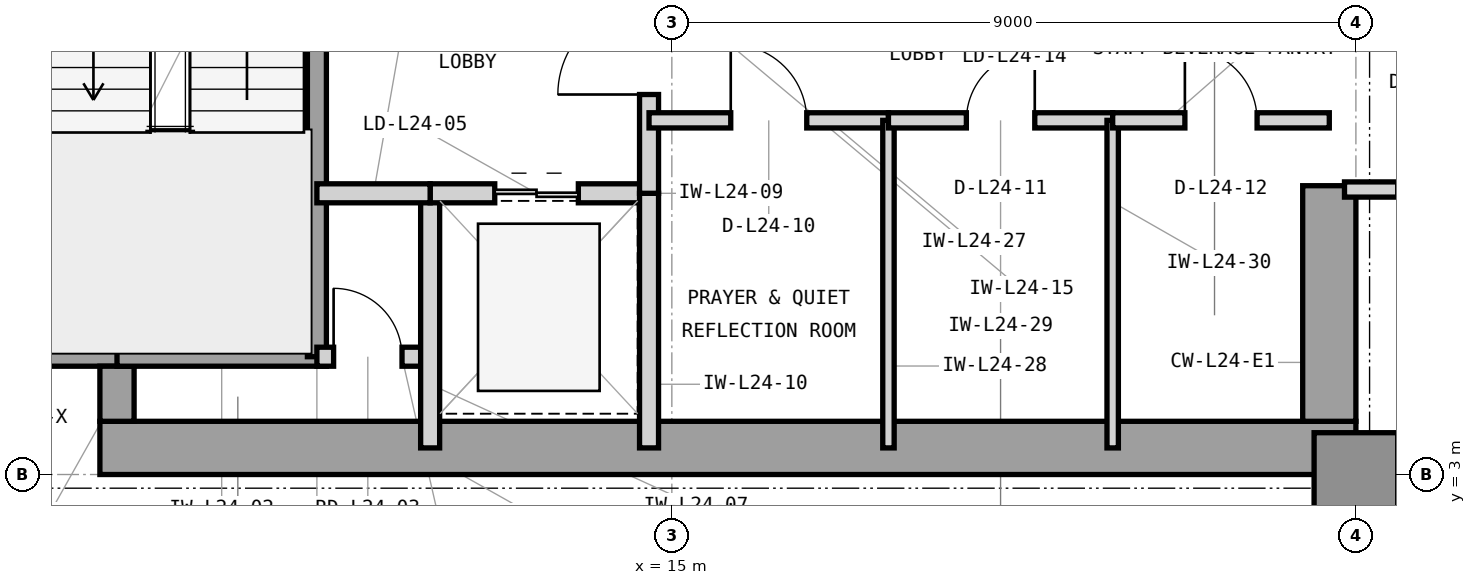
"""IFC4 building model, lengths in metres.
Left out: names, types, materials, properties, quantities, classifications, styles, units other than length and angle.
Written with IfcOpenShell. Run it as: python <this file> out.ifc"""

import sys

from ifc_helpers import new_model, si_unit, direction, frame, frame_2d, origin, origin_2d, place, context, subcontext, project, spatial, rectangle, extrude, element, fill, save


model = new_model("IFC4")
c1 = context("Model", 3, precision=1e-05, world=origin(), true_north=direction((0.0, 1.0)))
c2 = subcontext(c1, "Body", "Model", "MODEL_VIEW")
j1 = project(units=[si_unit("LENGTHUNIT", "METRE"), si_unit("PLANEANGLEUNIT", "RADIAN")], contexts=[c1])
p1 = place(None, origin())
s1 = spatial("IfcSite", under=j1, at=p1, CompositionType="ELEMENT")
p2 = place(p1, origin())
s2 = spatial("IfcBuilding", under=s1, at=p2, CompositionType="ELEMENT")
p3 = place(p2, frame((0.0, 0.0, 105.0)))
s3 = spatial("IfcBuildingStorey", under=s2, at=p3, CompositionType="ELEMENT", Elevation=105.0)
p4 = place(p3, frame((7.475, 3.35, 0.0), z_axis=(0.0, 0.0, 1.0), x_axis=(1.0, 0.0, 0.0)))
e1 = element("IfcWall", 1, at=p4, inside=s3, PredefinedType="SHEAR", context=c2, shape_type="SweptSolid", body=[
    extrude(rectangle(XDim=16.525, YDim=0.7, at=frame_2d((8.262, 0.0))), origin(), (0.0, 0.0, 1.0), 3.9),
])
p5 = place(p3, frame((23.65, 3.7, 0.0), z_axis=(0.0, 0.0, 1.0), x_axis=(0.0, 1.0, 0.0)))
e2 = element("IfcWall", 2, at=p5, inside=s3, PredefinedType="SHEAR", context=c2, shape_type="SweptSolid", body=[
    extrude(rectangle(XDim=3.1, YDim=0.7, at=frame_2d((1.55, 0.0))), origin(), (0.0, 0.0, 1.0), 3.9),
])
p6 = place(p3, frame((6.7, 4.65, 0.0), z_axis=(0.0, 0.0, 1.0), x_axis=(1.0, 0.0, 0.0)))
e3 = element("IfcWall", 3, at=p6, inside=s3, PredefinedType="SHEAR", context=c2, shape_type="SweptSolid", body=[
    extrude(rectangle(XDim=1.225, YDim=0.45, at=frame_2d((0.613, 0.0))), origin(), (0.0, 0.0, 1.0), 3.9),
])
p7 = place(p3, frame((7.7, 3.7, 0.0), z_axis=(0.0, 0.0, 1.0), x_axis=(0.0, 1.0, 0.0)))
e4 = element("IfcWall", 4, at=p7, inside=s3, PredefinedType="SHEAR", context=c2, shape_type="SweptSolid", body=[
    extrude(rectangle(XDim=0.725, YDim=0.45, at=frame_2d((0.363, 0.0))), origin(), (0.0, 0.0, 1.0), 3.9),
])
p8 = place(p3, frame((24.0, 3.0, 0.0), z_axis=(0.0, 0.0, 1.0), x_axis=(1.0, 0.0, 0.0)))
e5 = element("IfcColumn", 5, at=p8, inside=s3, PredefinedType="COLUMN", context=c2, shape_type="SweptSolid", body=[
    extrude(rectangle(XDim=1.1, YDim=1.1, at=origin_2d()), origin(), (0.0, 0.0, 1.0), 3.9),
])
p9 = place(p3, frame((23.9, 3.21, 0.0), z_axis=(0.0, 0.0, 1.0), x_axis=(1.0, 0.0, 0.0)))
e6 = element("IfcWall", 6, at=p9, inside=s3, PredefinedType="STANDARD", context=c2, shape_type="SweptSolid", body=[
    extrude(rectangle(XDim=37.5, YDim=0.42, at=frame_2d((18.75, 0.0))), origin(), (0.0, 0.0, 1.0), 3.7),
])
p10 = place(p9, frame((19.844, 0.0, 0.85)))
e7 = element("IfcOpeningElement", 7, at=p10, cuts=e6, PredefinedType="OPENING", context=c2, shape_type="SweptSolid", body=[
    extrude(rectangle(XDim=2.5, YDim=2.25, at=frame_2d((1.25, 1.125))), frame((0.0, 0.22, 0.0), z_axis=(0.0, -1.0, 0.0), x_axis=(1.0, 0.0, 0.0)), (0.0, 0.0, 1.0), 0.44),
])
p11 = place(p9, frame((1.1, 0.0, 0.85)))
e8 = element("IfcOpeningElement", 8, at=p11, cuts=e6, PredefinedType="OPENING", context=c2, shape_type="SweptSolid", body=[
    extrude(rectangle(XDim=1.2, YDim=2.25, at=frame_2d((0.6, 1.125))), frame((0.0, 0.22, 0.0), z_axis=(0.0, -1.0, 0.0), x_axis=(1.0, 0.0, 0.0)), (0.0, 0.0, 1.0), 0.44),
])
p12 = place(p9, frame((5.286, 0.0, 0.85)))
e9 = element("IfcOpeningElement", 9, at=p12, cuts=e6, PredefinedType="OPENING", context=c2, shape_type="SweptSolid", body=[
    extrude(rectangle(XDim=2.5, YDim=2.25, at=frame_2d((1.25, 1.125))), frame((0.0, 0.22, 0.0), z_axis=(0.0, -1.0, 0.0), x_axis=(1.0, 0.0, 0.0)), (0.0, 0.0, 1.0), 0.44),
])
p13 = place(p9, frame((13.036, 0.0, 0.85)))
e10 = element("IfcOpeningElement", 10, at=p13, cuts=e6, PredefinedType="OPENING", context=c2, shape_type="SweptSolid", body=[
    extrude(rectangle(XDim=2.5, YDim=2.25, at=frame_2d((1.25, 1.125))), frame((0.0, 0.22, 0.0), z_axis=(0.0, -1.0, 0.0), x_axis=(1.0, 0.0, 0.0)), (0.0, 0.0, 1.0), 0.44),
])
p14 = place(p9, frame((27.986, 0.0, 0.85)))
e11 = element("IfcOpeningElement", 11, at=p14, cuts=e6, PredefinedType="OPENING", context=c2, shape_type="SweptSolid", body=[
    extrude(rectangle(XDim=1.2, YDim=2.25, at=frame_2d((0.6, 1.125))), frame((0.0, 0.22, 0.0), z_axis=(0.0, -1.0, 0.0), x_axis=(1.0, 0.0, 0.0)), (0.0, 0.0, 1.0), 0.44),
])
p15 = place(p3, frame((7.7, 4.55, 0.0), z_axis=(0.0, 0.0, 1.0), x_axis=(1.0, 0.0, 0.0)))
e12 = element("IfcWall", 12, at=p15, inside=s3, PredefinedType="SHEAR", context=c2, shape_type="SweptSolid", body=[
    extrude(rectangle(XDim=2.755, YDim=0.25, at=frame_2d((1.377, 0.0))), origin(), (0.0, 0.0, 1.0), 3.9),
])
p16 = place(p3, frame((10.33, 4.55, 0.0), z_axis=(0.0, 0.0, 1.0), x_axis=(0.0, 1.0, 0.0)))
e13 = element("IfcWall", 13, at=p16, inside=s3, PredefinedType="SHEAR", context=c2, shape_type="SweptSolid", body=[
    extrude(rectangle(XDim=7.45, YDim=0.25, at=frame_2d((3.725, 0.0))), origin(), (0.0, 0.0, 1.0), 3.9),
])
p17 = place(p16, frame((5.9, 0.0, 0.0)))
e14 = element("IfcOpeningElement", 14, at=p17, cuts=e13, PredefinedType="OPENING", context=c2, shape_type="SweptSolid", body=[
    extrude(rectangle(XDim=1.25, YDim=2.2, at=frame_2d((0.625, 1.1))), frame((0.0, 0.135, 0.0), z_axis=(0.0, -1.0, 0.0), x_axis=(1.0, 0.0, 0.0)), (0.0, 0.0, 1.0), 0.27),
])
p18 = place(p3, frame((10.33, 4.55, 0.0), z_axis=(0.0, 0.0, 1.0), x_axis=(1.0, 0.0, 0.0)))
e15 = element("IfcWall", 15, at=p18, inside=s3, PredefinedType="PARTITIONING", context=c2, shape_type="SweptSolid", body=[
    extrude(rectangle(XDim=1.49, YDim=0.25, at=frame_2d((0.745, 0.0))), origin(), (0.0, 0.0, 1.0), 3.69),
])
p19 = place(p18, frame((0.22, 0.0, 0.0)))
e16 = element("IfcOpeningElement", 16, at=p19, cuts=e15, PredefinedType="OPENING", context=c2, shape_type="SweptSolid", body=[
    extrude(rectangle(XDim=0.9, YDim=2.1, at=frame_2d((0.45, 1.05))), frame((0.0, 0.135, 0.0), z_axis=(0.0, -1.0, 0.0), x_axis=(1.0, 0.0, 0.0)), (0.0, 0.0, 1.0), 0.27),
])
p20 = place(p3, frame((11.82, 3.35, 0.0), z_axis=(0.0, 0.0, 1.0), x_axis=(0.0, 1.0, 0.0)))
e17 = element("IfcWall", 17, at=p20, inside=s3, PredefinedType="PARTITIONING", context=c2, shape_type="SweptSolid", body=[
    extrude(rectangle(XDim=3.35, YDim=0.25, at=frame_2d((1.675, 0.0))), origin(), (0.0, 0.0, 1.0), 3.69),
])
p21 = place(p3, frame((11.82, 6.7, 0.0), z_axis=(0.0, 0.0, 1.0), x_axis=(1.0, 0.0, 0.0)))
e18 = element("IfcWall", 18, at=p21, inside=s3, PredefinedType="PARTITIONING", context=c2, shape_type="SweptSolid", body=[
    extrude(rectangle(XDim=2.88, YDim=0.25, at=frame_2d((1.44, 0.0))), origin(), (0.0, 0.0, 1.0), 3.227),
])
p22 = place(p21, frame((0.85, 0.0, 0.0)))
e19 = element("IfcOpeningElement", 19, at=p22, cuts=e18, PredefinedType="OPENING", context=c2, shape_type="SweptSolid", body=[
    extrude(rectangle(XDim=1.1, YDim=2.25, at=frame_2d((0.55, 1.125))), frame((0.0, 0.135, 0.0), z_axis=(0.0, -1.0, 0.0), x_axis=(1.0, 0.0, 0.0)), (0.0, 0.0, 1.0), 0.27),
])
p23 = place(p3, frame((14.7, 3.35, 0.0), z_axis=(0.0, 0.0, 1.0), x_axis=(0.0, 1.0, 0.0)))
e20 = element("IfcWall", 20, at=p23, inside=s3, PredefinedType="PARTITIONING", context=c2, shape_type="SweptSolid", body=[
    extrude(rectangle(XDim=3.35, YDim=0.25, at=frame_2d((1.675, 0.0))), origin(), (0.0, 0.0, 1.0), 3.69),
])
p24 = place(p3, frame((14.7, 6.7, 0.0), z_axis=(0.0, 0.0, 1.0), x_axis=(0.0, 1.0, 0.0)))
e21 = element("IfcWall", 21, at=p24, inside=s3, PredefinedType="PARTITIONING", context=c2, shape_type="SweptSolid", body=[
    extrude(rectangle(XDim=3.8, YDim=0.25, at=frame_2d((1.9, 0.0))), origin(), (0.0, 0.0, 1.0), 3.69),
])
p25 = place(p24, frame((1.3, 0.0, 0.0)))
e22 = element("IfcOpeningElement", 22, at=p25, cuts=e21, PredefinedType="OPENING", context=c2, shape_type="SweptSolid", body=[
    extrude(rectangle(XDim=1.2, YDim=2.2, at=frame_2d((0.6, 1.1))), frame((0.0, 0.135, 0.0), z_axis=(0.0, -1.0, 0.0), x_axis=(1.0, 0.0, 0.0)), (0.0, 0.0, 1.0), 0.27),
])
p26 = place(p3, frame((10.33, 6.7, 0.0), z_axis=(0.0, 0.0, 1.0), x_axis=(1.0, 0.0, 0.0)))
e23 = element("IfcWall", 23, at=p26, inside=s3, PredefinedType="PARTITIONING", context=c2, shape_type="SweptSolid", body=[
    extrude(rectangle(XDim=1.49, YDim=0.25, at=frame_2d((0.745, 0.0))), origin(), (0.0, 0.0, 1.0), 3.227),
])
p27 = place(p3, frame((14.7, 7.66, 0.0), z_axis=(0.0, 0.0, 1.0), x_axis=(1.0, 0.0, 0.0)))
e24 = element("IfcWall", 24, at=p27, inside=s3, PredefinedType="PARTITIONING", context=c2, shape_type="SweptSolid", body=[
    extrude(rectangle(XDim=3.15, YDim=0.2, at=frame_2d((1.575, 0.0))), origin(), (0.0, 0.0, 1.0), 3.69),
])
p28 = place(p27, frame((1.075, 0.0, 0.0)))
e25 = element("IfcOpeningElement", 25, at=p28, cuts=e24, PredefinedType="OPENING", context=c2, shape_type="SweptSolid", body=[
    extrude(rectangle(XDim=1.0, YDim=2.15, at=frame_2d((0.5, 1.075))), frame((0.0, 0.11, 0.0), z_axis=(0.0, -1.0, 0.0), x_axis=(1.0, 0.0, 0.0)), (0.0, 0.0, 1.0), 0.22),
])
p29 = place(p3, frame((17.85, 3.35, 0.0), z_axis=(0.0, 0.0, 1.0), x_axis=(0.0, 1.0, 0.0)))
e26 = element("IfcWall", 26, at=p29, inside=s3, PredefinedType="PARTITIONING", context=c2, shape_type="SweptSolid", body=[
    extrude(rectangle(XDim=4.31, YDim=0.15, at=frame_2d((2.155, 0.0))), origin(), (0.0, 0.0, 1.0), 3.69),
])
p30 = place(p3, frame((17.85, 7.66, 0.0), z_axis=(0.0, 0.0, 1.0), x_axis=(1.0, 0.0, 0.0)))
e27 = element("IfcWall", 27, at=p30, inside=s3, PredefinedType="PARTITIONING", context=c2, shape_type="SweptSolid", body=[
    extrude(rectangle(XDim=2.95, YDim=0.2, at=frame_2d((1.475, 0.0))), origin(), (0.0, 0.0, 1.0), 3.69),
])
p31 = place(p30, frame((1.025, 0.0, 0.0)))
e28 = element("IfcOpeningElement", 28, at=p31, cuts=e27, PredefinedType="OPENING", context=c2, shape_type="SweptSolid", body=[
    extrude(rectangle(XDim=0.9, YDim=2.1, at=frame_2d((0.45, 1.05))), frame((0.0, 0.11, 0.0), z_axis=(0.0, -1.0, 0.0), x_axis=(1.0, 0.0, 0.0)), (0.0, 0.0, 1.0), 0.22),
])
p32 = place(p3, frame((20.8, 3.35, 0.0), z_axis=(0.0, 0.0, 1.0), x_axis=(0.0, 1.0, 0.0)))
e29 = element("IfcWall", 29, at=p32, inside=s3, PredefinedType="PARTITIONING", context=c2, shape_type="SweptSolid", body=[
    extrude(rectangle(XDim=4.31, YDim=0.15, at=frame_2d((2.155, 0.0))), origin(), (0.0, 0.0, 1.0), 3.69),
])
p33 = place(p3, frame((20.8, 7.66, 0.0), z_axis=(0.0, 0.0, 1.0), x_axis=(1.0, 0.0, 0.0)))
e30 = element("IfcWall", 30, at=p33, inside=s3, PredefinedType="PARTITIONING", context=c2, shape_type="SweptSolid", body=[
    extrude(rectangle(XDim=2.85, YDim=0.2, at=frame_2d((1.425, 0.0))), origin(), (0.0, 0.0, 1.0), 3.69),
])
p34 = place(p33, frame((0.95, 0.0, 0.0)))
e31 = element("IfcOpeningElement", 31, at=p34, cuts=e30, PredefinedType="OPENING", context=c2, shape_type="SweptSolid", body=[
    extrude(rectangle(XDim=0.95, YDim=2.1, at=frame_2d((0.475, 1.05))), frame((0.0, 0.11, 0.0), z_axis=(0.0, -1.0, 0.0), x_axis=(1.0, 0.0, 0.0)), (0.0, 0.0, 1.0), 0.22),
])
p35 = place(p3, frame((23.85, 6.75, 0.0), z_axis=(0.0, 0.0, 1.0), x_axis=(1.0, 0.0, 0.0)))
e32 = element("IfcWall", 32, at=p35, inside=s3, PredefinedType="PARTITIONING", context=c2, shape_type="SweptSolid", body=[
    extrude(rectangle(XDim=2.85, YDim=0.2, at=frame_2d((1.425, 0.0))), origin(), (0.0, 0.0, 1.0), 3.69),
])
p36 = place(p35, frame((0.7, 0.0, 0.0)))
e33 = element("IfcOpeningElement", 33, at=p36, cuts=e32, PredefinedType="OPENING", context=c2, shape_type="SweptSolid", body=[
    extrude(rectangle(XDim=1.0, YDim=2.15, at=frame_2d((0.5, 1.075))), frame((0.0, 0.11, 0.0), z_axis=(0.0, -1.0, 0.0), x_axis=(1.0, 0.0, 0.0)), (0.0, 0.0, 1.0), 0.22),
])
p37 = place(p19, origin())
e34 = element("IfcDoor", 34, at=p37, inside=s3, OperationType="SINGLE_SWING_LEFT", PredefinedType="TRAPDOOR", context=c2, shape_type="SweptSolid", body=[
    extrude(rectangle(XDim=0.9, YDim=2.1, at=frame_2d((0.45, 1.05))), frame((0.0, 0.025, 0.0), z_axis=(0.0, -1.0, 0.0), x_axis=(1.0, 0.0, 0.0)), (0.0, 0.0, 1.0), 0.05),
])
fill(e16, e34)
p38 = place(p22, origin())
e35 = element("IfcDoor", 35, at=p38, inside=s3, OperationType="DOUBLE_DOOR_SLIDING", PredefinedType="DOOR", context=c2, shape_type="SweptSolid", body=[
    extrude(rectangle(XDim=1.1, YDim=2.25, at=frame_2d((0.55, 1.125))), frame((0.0, 0.025, 0.0), z_axis=(0.0, -1.0, 0.0), x_axis=(1.0, 0.0, 0.0)), (0.0, 0.0, 1.0), 0.05),
])
fill(e19, e35)
p39 = place(p25, origin())
e36 = element("IfcDoor", 36, at=p39, inside=s3, OperationType="SINGLE_SWING_LEFT", PredefinedType="DOOR", context=c2, shape_type="SweptSolid", body=[
    extrude(rectangle(XDim=1.2, YDim=2.2, at=frame_2d((0.6, 1.1))), frame((0.0, 0.025, 0.0), z_axis=(0.0, -1.0, 0.0), x_axis=(1.0, 0.0, 0.0)), (0.0, 0.0, 1.0), 0.05),
])
fill(e22, e36)
p40 = place(p28, origin())
e37 = element("IfcDoor", 37, at=p40, inside=s3, OperationType="SINGLE_SWING_LEFT", PredefinedType="DOOR", context=c2, shape_type="SweptSolid", body=[
    extrude(rectangle(XDim=1.0, YDim=2.15, at=frame_2d((0.5, 1.075))), frame((0.0, 0.025, 0.0), z_axis=(0.0, -1.0, 0.0), x_axis=(1.0, 0.0, 0.0)), (0.0, 0.0, 1.0), 0.05),
])
fill(e25, e37)
p41 = place(p31, origin())
e38 = element("IfcDoor", 38, at=p41, inside=s3, OperationType="SINGLE_SWING_RIGHT", PredefinedType="TRAPDOOR", context=c2, shape_type="SweptSolid", body=[
    extrude(rectangle(XDim=0.9, YDim=2.1, at=frame_2d((0.45, 1.05))), frame((0.0, 0.025, 0.0), z_axis=(0.0, -1.0, 0.0), x_axis=(1.0, 0.0, 0.0)), (0.0, 0.0, 1.0), 0.05),
])
fill(e28, e38)
p42 = place(p34, origin())
e39 = element("IfcDoor", 39, at=p42, inside=s3, OperationType="SINGLE_SWING_LEFT", PredefinedType="DOOR", context=c2, shape_type="SweptSolid", body=[
    extrude(rectangle(XDim=0.95, YDim=2.1, at=frame_2d((0.475, 1.05))), frame((0.0, 0.025, 0.0), z_axis=(0.0, -1.0, 0.0), x_axis=(1.0, 0.0, 0.0)), (0.0, 0.0, 1.0), 0.05),
])
fill(e31, e39)
save(model, sys.argv[1])
